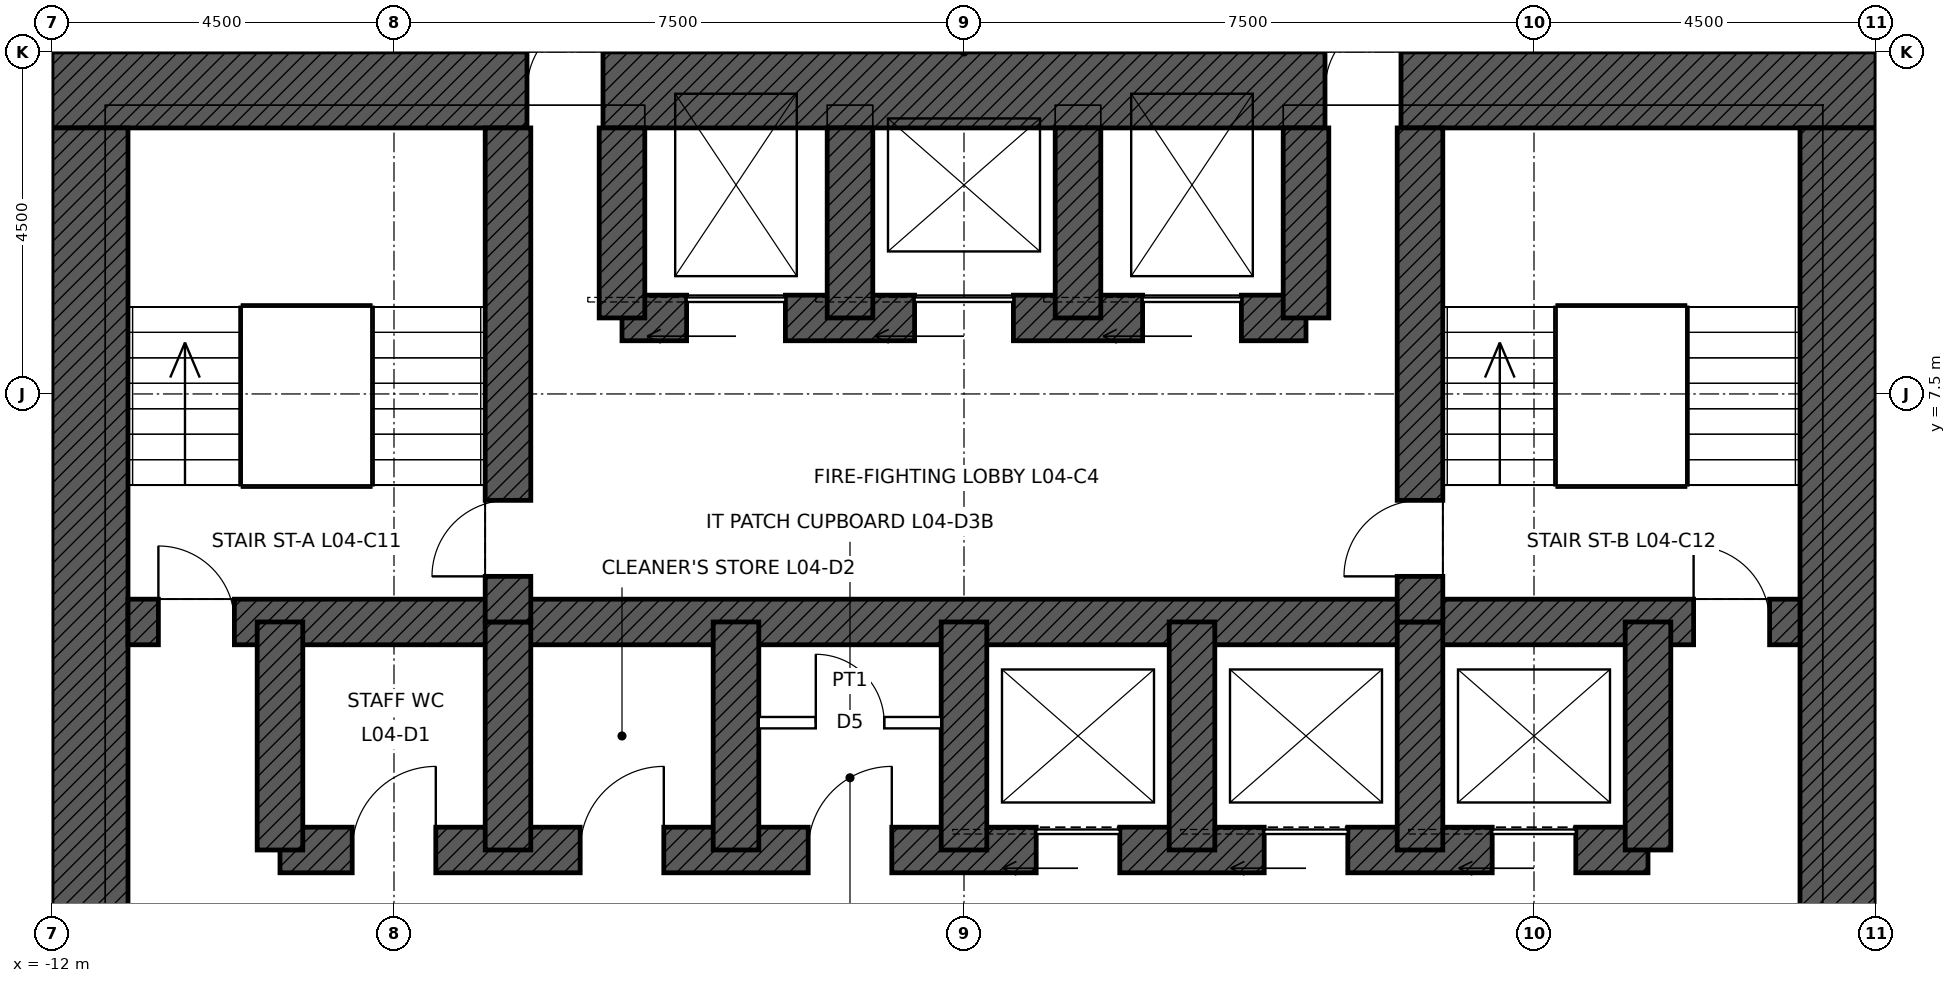
"""IFC4 building model, lengths in metres.
Left out: names, types, materials, properties, quantities, classifications, styles, units other than length and angle.
Written with IfcOpenShell. Run it as: python <this file> out.ifc"""

import sys

from ifc_helpers import new_model, si_unit, direction, frame, frame_2d, origin, place, context, subcontext, project, spatial, rectangle, extrude, element, fill, save


model = new_model("IFC4")
c1 = context("Model", 3, precision=1e-05, world=origin(), true_north=direction((0.0, 1.0)))
c2 = subcontext(c1, "Body", "Model", "MODEL_VIEW")
j1 = project(units=[si_unit("LENGTHUNIT", "METRE"), si_unit("PLANEANGLEUNIT", "RADIAN")], contexts=[c1])
p1 = place(None, origin())
s1 = spatial("IfcSite", under=j1, at=p1, CompositionType="ELEMENT")
p2 = place(p1, origin())
s2 = spatial("IfcBuilding", under=s1, at=p2, CompositionType="ELEMENT")
p3 = place(p2, frame((0.0, 0.0, 23.4)))
s3 = spatial("IfcBuildingStorey", under=s2, at=p3, CompositionType="ELEMENT", Elevation=23.4)
p4 = place(p3, frame((-12.0, 11.5, 0.0), z_axis=(0.0, 0.0, 1.0), x_axis=(1.0, 0.0, 0.0)))
e1 = element("IfcWall", 1, at=p4, inside=s3, PredefinedType="SHEAR", context=c2, shape_type="SweptSolid", body=[
    extrude(rectangle(XDim=24.0, YDim=1.0, at=frame_2d((12.0, 0.0))), origin(), (0.0, 0.0, 1.0), 5.0),
])
p5 = place(p4, frame((6.25, 0.0, 0.0)))
e2 = element("IfcOpeningElement", 2, at=p5, cuts=e1, PredefinedType="OPENING", context=c2, shape_type="SweptSolid", body=[
    extrude(rectangle(XDim=1.0, YDim=2.4, at=frame_2d((0.5, 1.2))), frame((0.0, 0.51, 0.0), z_axis=(0.0, -1.0, 0.0), x_axis=(1.0, 0.0, 0.0)), (0.0, 0.0, 1.0), 1.02),
])
p6 = place(p4, frame((16.75, 0.0, 0.0)))
e3 = element("IfcOpeningElement", 3, at=p6, cuts=e1, PredefinedType="OPENING", context=c2, shape_type="SweptSolid", body=[
    extrude(rectangle(XDim=1.0, YDim=2.4, at=frame_2d((0.5, 1.2))), frame((0.0, 0.51, 0.0), z_axis=(0.0, -1.0, 0.0), x_axis=(1.0, 0.0, 0.0)), (0.0, 0.0, 1.0), 1.02),
])
p7 = place(p3, frame((11.5, 11.0, 0.0), z_axis=(0.0, 0.0, 1.0), x_axis=(0.0, -1.0, 0.0)))
e4 = element("IfcWall", 4, at=p7, inside=s3, PredefinedType="SHEAR", context=c2, shape_type="SweptSolid", body=[
    extrude(rectangle(XDim=22.0, YDim=1.0, at=frame_2d((11.0, 0.0))), origin(), (0.0, 0.0, 1.0), 5.0),
])
p8 = place(p7, frame((10.5, 0.0, 0.0)))
e5 = element("IfcOpeningElement", 5, at=p8, cuts=e4, PredefinedType="OPENING", context=c2, shape_type="SweptSolid", body=[
    extrude(rectangle(XDim=1.0, YDim=2.4, at=frame_2d((0.5, 1.2))), frame((0.0, 0.51, 0.0), z_axis=(0.0, -1.0, 0.0), x_axis=(1.0, 0.0, 0.0)), (0.0, 0.0, 1.0), 1.02),
])
p9 = place(p3, frame((-11.5, -11.0, 0.0), z_axis=(0.0, 0.0, 1.0), x_axis=(0.0, 1.0, 0.0)))
e6 = element("IfcWall", 6, at=p9, inside=s3, PredefinedType="SHEAR", context=c2, shape_type="SweptSolid", body=[
    extrude(rectangle(XDim=22.0, YDim=1.0, at=frame_2d((11.0, 0.0))), origin(), (0.0, 0.0, 1.0), 5.0),
])
p10 = place(p9, frame((10.5, 0.0, 0.0)))
e7 = element("IfcOpeningElement", 7, at=p10, cuts=e6, PredefinedType="OPENING", context=c2, shape_type="SweptSolid", body=[
    extrude(rectangle(XDim=1.0, YDim=2.4, at=frame_2d((0.5, 1.2))), frame((0.0, 0.51, 0.0), z_axis=(0.0, -1.0, 0.0), x_axis=(1.0, 0.0, 0.0)), (0.0, 0.0, 1.0), 1.02),
])
p11 = place(p3, frame((-11.0, 4.5, 0.0), z_axis=(0.0, 0.0, 1.0), x_axis=(1.0, 0.0, 0.0)))
e8 = element("IfcWall", 8, at=p11, inside=s3, PredefinedType="SHEAR", context=c2, shape_type="SweptSolid", body=[
    extrude(rectangle(XDim=22.0, YDim=0.6, at=frame_2d((11.0, 0.0))), origin(), (0.0, 0.0, 1.0), 5.0),
])
p12 = place(p11, frame((0.4, 0.0, 0.0)))
e9 = element("IfcOpeningElement", 9, at=p12, cuts=e8, PredefinedType="OPENING", context=c2, shape_type="SweptSolid", body=[
    extrude(rectangle(XDim=1.0, YDim=2.1, at=frame_2d((0.5, 1.05))), frame((0.0, 0.31, 0.0), z_axis=(0.0, -1.0, 0.0), x_axis=(1.0, 0.0, 0.0)), (0.0, 0.0, 1.0), 0.62),
])
p13 = place(p11, frame((20.6, 0.0, 0.0)))
e10 = element("IfcOpeningElement", 10, at=p13, cuts=e8, PredefinedType="OPENING", context=c2, shape_type="SweptSolid", body=[
    extrude(rectangle(XDim=1.0, YDim=2.1, at=frame_2d((0.5, 1.05))), frame((0.0, 0.31, 0.0), z_axis=(0.0, -1.0, 0.0), x_axis=(1.0, 0.0, 0.0)), (0.0, 0.0, 1.0), 0.62),
])
p14 = place(p3, frame((-9.0, 1.5, 0.0), z_axis=(0.0, 0.0, 1.0), x_axis=(1.0, 0.0, 0.0)))
e11 = element("IfcWall", 11, at=p14, inside=s3, PredefinedType="SHEAR", context=c2, shape_type="SweptSolid", body=[
    extrude(rectangle(XDim=18.0, YDim=0.6, at=frame_2d((9.0, 0.0))), origin(), (0.0, 0.0, 1.0), 5.0),
])
p15 = place(p14, frame((9.95, 0.0, 0.0)))
e12 = element("IfcOpeningElement", 12, at=p15, cuts=e11, PredefinedType="OPENING", context=c2, shape_type="SweptSolid", body=[
    extrude(rectangle(XDim=1.1, YDim=2.1, at=frame_2d((0.55, 1.05))), frame((0.0, 0.31, 0.0), z_axis=(0.0, -1.0, 0.0), x_axis=(1.0, 0.0, 0.0)), (0.0, 0.0, 1.0), 0.62),
])
p16 = place(p14, frame((12.95, 0.0, 0.0)))
e13 = element("IfcOpeningElement", 13, at=p16, cuts=e11, PredefinedType="OPENING", context=c2, shape_type="SweptSolid", body=[
    extrude(rectangle(XDim=1.1, YDim=2.1, at=frame_2d((0.55, 1.05))), frame((0.0, 0.31, 0.0), z_axis=(0.0, -1.0, 0.0), x_axis=(1.0, 0.0, 0.0)), (0.0, 0.0, 1.0), 0.62),
])
p17 = place(p14, frame((15.95, 0.0, 0.0)))
e14 = element("IfcOpeningElement", 14, at=p17, cuts=e11, PredefinedType="OPENING", context=c2, shape_type="SweptSolid", body=[
    extrude(rectangle(XDim=1.1, YDim=2.1, at=frame_2d((0.55, 1.05))), frame((0.0, 0.31, 0.0), z_axis=(0.0, -1.0, 0.0), x_axis=(1.0, 0.0, 0.0)), (0.0, 0.0, 1.0), 0.62),
])
p18 = place(p14, frame((0.95, 0.0, 0.0)))
e15 = element("IfcOpeningElement", 15, at=p18, cuts=e11, PredefinedType="OPENING", context=c2, shape_type="SweptSolid", body=[
    extrude(rectangle(XDim=1.1, YDim=2.1, at=frame_2d((0.55, 1.05))), frame((0.0, 0.31, 0.0), z_axis=(0.0, -1.0, 0.0), x_axis=(1.0, 0.0, 0.0)), (0.0, 0.0, 1.0), 0.62),
])
p19 = place(p14, frame((3.95, 0.0, 0.0)))
e16 = element("IfcOpeningElement", 16, at=p19, cuts=e11, PredefinedType="OPENING", context=c2, shape_type="SweptSolid", body=[
    extrude(rectangle(XDim=1.1, YDim=2.1, at=frame_2d((0.55, 1.05))), frame((0.0, 0.31, 0.0), z_axis=(0.0, -1.0, 0.0), x_axis=(1.0, 0.0, 0.0)), (0.0, 0.0, 1.0), 0.62),
])
p20 = place(p14, frame((6.95, 0.0, 0.0)))
e17 = element("IfcOpeningElement", 17, at=p20, cuts=e11, PredefinedType="OPENING", context=c2, shape_type="SweptSolid", body=[
    extrude(rectangle(XDim=1.1, YDim=2.1, at=frame_2d((0.55, 1.05))), frame((0.0, 0.31, 0.0), z_axis=(0.0, -1.0, 0.0), x_axis=(1.0, 0.0, 0.0)), (0.0, 0.0, 1.0), 0.62),
])
p21 = place(p3, frame((-4.5, 8.5, 0.0), z_axis=(0.0, 0.0, 1.0), x_axis=(1.0, 0.0, 0.0)))
e18 = element("IfcWall", 18, at=p21, inside=s3, PredefinedType="SHEAR", context=c2, shape_type="SweptSolid", body=[
    extrude(rectangle(XDim=9.0, YDim=0.6, at=frame_2d((4.5, 0.0))), origin(), (0.0, 0.0, 1.0), 5.0),
])
p22 = place(p21, frame((0.85, 0.0, 0.0)))
e19 = element("IfcOpeningElement", 19, at=p22, cuts=e18, PredefinedType="OPENING", context=c2, shape_type="SweptSolid", body=[
    extrude(rectangle(XDim=1.3, YDim=2.4, at=frame_2d((0.65, 1.2))), frame((0.0, 0.31, 0.0), z_axis=(0.0, -1.0, 0.0), x_axis=(1.0, 0.0, 0.0)), (0.0, 0.0, 1.0), 0.62),
])
p23 = place(p21, frame((6.85, 0.0, 0.0)))
e20 = element("IfcOpeningElement", 20, at=p23, cuts=e18, PredefinedType="OPENING", context=c2, shape_type="SweptSolid", body=[
    extrude(rectangle(XDim=1.3, YDim=2.4, at=frame_2d((0.65, 1.2))), frame((0.0, 0.31, 0.0), z_axis=(0.0, -1.0, 0.0), x_axis=(1.0, 0.0, 0.0)), (0.0, 0.0, 1.0), 0.62),
])
p24 = place(p21, frame((3.85, 0.0, 0.0)))
e21 = element("IfcOpeningElement", 21, at=p24, cuts=e18, PredefinedType="OPENING", context=c2, shape_type="SweptSolid", body=[
    extrude(rectangle(XDim=1.3, YDim=2.4, at=frame_2d((0.65, 1.2))), frame((0.0, 0.31, 0.0), z_axis=(0.0, -1.0, 0.0), x_axis=(1.0, 0.0, 0.0)), (0.0, 0.0, 1.0), 0.62),
])
for number, where, z_axis, x_axis in (
    (22, (-9.0, 1.5, 0.0), (0.0, 0.0, 1.0), (0.0, 1.0, 0.0)),
    (23, (9.0, 1.5, 0.0), (0.0, 0.0, 1.0), (0.0, 1.0, 0.0)),
    (24, (-6.0, 1.5, 0.0), (0.0, 0.0, 1.0), (0.0, 1.0, 0.0)),
    (25, (-3.0, 1.5, 0.0), (0.0, 0.0, 1.0), (0.0, 1.0, 0.0)),
    (26, (0.0, 1.5, 0.0), (0.0, 0.0, 1.0), (0.0, 1.0, 0.0)),
    (27, (3.0, 1.5, 0.0), (0.0, 0.0, 1.0), (0.0, 1.0, 0.0)),
    (28, (6.0, 1.5, 0.0), (0.0, 0.0, 1.0), (0.0, 1.0, 0.0)),
):
    element("IfcWall", number, at=place(p3, frame(where, z_axis=z_axis, x_axis=x_axis)), inside=s3, PredefinedType="SHEAR", context=c2, shape_type="SweptSolid", body=[
        extrude(rectangle(XDim=3.0, YDim=0.6, at=frame_2d((1.5, 0.0))), origin(), (0.0, 0.0, 1.0), 5.0),
    ])
p25 = place(p3, frame((-6.0, 4.5, 0.0), z_axis=(0.0, 0.0, 1.0), x_axis=(0.0, 1.0, 0.0)))
e29 = element("IfcWall", 29, at=p25, inside=s3, PredefinedType="SHEAR", context=c2, shape_type="SweptSolid", body=[
    extrude(rectangle(XDim=6.5, YDim=0.6, at=frame_2d((3.25, 0.0))), origin(), (0.0, 0.0, 1.0), 5.0),
])
p26 = place(p25, frame((0.6, 0.0, 0.0)))
e30 = element("IfcOpeningElement", 30, at=p26, cuts=e29, PredefinedType="OPENING", context=c2, shape_type="SweptSolid", body=[
    extrude(rectangle(XDim=1.0, YDim=2.1, at=frame_2d((0.5, 1.05))), frame((0.0, 0.31, 0.0), z_axis=(0.0, -1.0, 0.0), x_axis=(1.0, 0.0, 0.0)), (0.0, 0.0, 1.0), 0.62),
])
p27 = place(p3, frame((6.0, 4.5, 0.0), z_axis=(0.0, 0.0, 1.0), x_axis=(0.0, 1.0, 0.0)))
e31 = element("IfcWall", 31, at=p27, inside=s3, PredefinedType="SHEAR", context=c2, shape_type="SweptSolid", body=[
    extrude(rectangle(XDim=6.5, YDim=0.6, at=frame_2d((3.25, 0.0))), origin(), (0.0, 0.0, 1.0), 5.0),
])
p28 = place(p27, frame((0.6, 0.0, 0.0)))
e32 = element("IfcOpeningElement", 32, at=p28, cuts=e31, PredefinedType="OPENING", context=c2, shape_type="SweptSolid", body=[
    extrude(rectangle(XDim=1.0, YDim=2.1, at=frame_2d((0.5, 1.05))), frame((0.0, 0.31, 0.0), z_axis=(0.0, -1.0, 0.0), x_axis=(1.0, 0.0, 0.0)), (0.0, 0.0, 1.0), 0.62),
])
for number, where, z_axis, x_axis in (
    (33, (-4.5, 8.5, 0.0), (0.0, 0.0, 1.0), (0.0, 1.0, 0.0)),
    (34, (4.5, 8.5, 0.0), (0.0, 0.0, 1.0), (0.0, 1.0, 0.0)),
    (35, (-1.5, 8.5, 0.0), (0.0, 0.0, 1.0), (0.0, 1.0, 0.0)),
    (36, (1.5, 8.5, 0.0), (0.0, 0.0, 1.0), (0.0, 1.0, 0.0)),
):
    element("IfcWall", number, at=place(p3, frame(where, z_axis=z_axis, x_axis=x_axis)), inside=s3, PredefinedType="SHEAR", context=c2, shape_type="SweptSolid", body=[
        extrude(rectangle(XDim=2.5, YDim=0.6, at=frame_2d((1.25, 0.0))), origin(), (0.0, 0.0, 1.0), 5.0),
    ])
p29 = place(p3, frame((-2.7, 3.175, 0.0), z_axis=(0.0, 0.0, 1.0), x_axis=(1.0, 0.0, 0.0)))
e37 = element("IfcWall", 37, at=p29, inside=s3, PredefinedType="PARTITIONING", context=c2, shape_type="SweptSolid", body=[
    extrude(rectangle(XDim=2.4, YDim=0.15, at=frame_2d((1.2, 0.0))), origin(), (0.0, 0.0, 1.0), 4.75),
])
p30 = place(p29, frame((0.75, 0.0, 0.0)))
e38 = element("IfcOpeningElement", 38, at=p30, cuts=e37, PredefinedType="OPENING", context=c2, shape_type="SweptSolid", body=[
    extrude(rectangle(XDim=0.9, YDim=2.1, at=frame_2d((0.45, 1.05))), frame((0.0, 0.085, 0.0), z_axis=(0.0, -1.0, 0.0), x_axis=(1.0, 0.0, 0.0)), (0.0, 0.0, 1.0), 0.17),
])
p31 = place(p12, origin())
e39 = element("IfcDoor", 39, at=p31, inside=s3, OperationType="SINGLE_SWING_LEFT", PredefinedType="DOOR", context=c2, shape_type="SweptSolid", body=[
    extrude(rectangle(XDim=1.0, YDim=2.1, at=frame_2d((0.5, 1.05))), frame((0.0, 0.025, 0.0), z_axis=(0.0, -1.0, 0.0), x_axis=(1.0, 0.0, 0.0)), (0.0, 0.0, 1.0), 0.05),
])
fill(e9, e39)
p32 = place(p13, origin())
e40 = element("IfcDoor", 40, at=p32, inside=s3, OperationType="SINGLE_SWING_LEFT", PredefinedType="DOOR", context=c2, shape_type="SweptSolid", body=[
    extrude(rectangle(XDim=1.0, YDim=2.1, at=frame_2d((0.5, 1.05))), frame((0.0, 0.025, 0.0), z_axis=(0.0, -1.0, 0.0), x_axis=(1.0, 0.0, 0.0)), (0.0, 0.0, 1.0), 0.05),
])
fill(e10, e40)
p33 = place(p26, origin())
e41 = element("IfcDoor", 41, at=p33, inside=s3, OperationType="SINGLE_SWING_LEFT", PredefinedType="DOOR", context=c2, shape_type="SweptSolid", body=[
    extrude(rectangle(XDim=1.0, YDim=2.1, at=frame_2d((0.5, 1.05))), frame((0.0, 0.025, 0.0), z_axis=(0.0, -1.0, 0.0), x_axis=(1.0, 0.0, 0.0)), (0.0, 0.0, 1.0), 0.05),
])
fill(e30, e41)
p34 = place(p28, origin())
e42 = element("IfcDoor", 42, at=p34, inside=s3, OperationType="SINGLE_SWING_LEFT", PredefinedType="DOOR", context=c2, shape_type="SweptSolid", body=[
    extrude(rectangle(XDim=1.0, YDim=2.1, at=frame_2d((0.5, 1.05))), frame((0.0, 0.025, 0.0), z_axis=(0.0, -1.0, 0.0), x_axis=(1.0, 0.0, 0.0)), (0.0, 0.0, 1.0), 0.05),
])
fill(e32, e42)
p35 = place(p5, origin())
e43 = element("IfcDoor", 43, at=p35, inside=s3, OperationType="SINGLE_SWING_RIGHT", PredefinedType="DOOR", context=c2, shape_type="SweptSolid", body=[
    extrude(rectangle(XDim=1.0, YDim=2.4, at=frame_2d((0.5, 1.2))), frame((0.0, 0.485, 0.0), z_axis=(0.0, -1.0, 0.0), x_axis=(1.0, 0.0, 0.0)), (0.0, 0.0, 1.0), 0.05),
])
fill(e2, e43)
p36 = place(p6, origin())
e44 = element("IfcDoor", 44, at=p36, inside=s3, OperationType="SINGLE_SWING_RIGHT", PredefinedType="DOOR", context=c2, shape_type="SweptSolid", body=[
    extrude(rectangle(XDim=1.0, YDim=2.4, at=frame_2d((0.5, 1.2))), frame((0.0, 0.485, 0.0), z_axis=(0.0, -1.0, 0.0), x_axis=(1.0, 0.0, 0.0)), (0.0, 0.0, 1.0), 0.05),
])
fill(e3, e44)
p37 = place(p22, origin())
e45 = element("IfcDoor", 45, at=p37, inside=s3, OperationType="SLIDING_TO_LEFT", PredefinedType="DOOR", context=c2, shape_type="SweptSolid", body=[
    extrude(rectangle(XDim=1.3, YDim=2.4, at=frame_2d((0.65, 1.2))), frame((0.0, 0.025, 0.0), z_axis=(0.0, -1.0, 0.0), x_axis=(1.0, 0.0, 0.0)), (0.0, 0.0, 1.0), 0.05),
])
fill(e19, e45)
p38 = place(p23, origin())
e46 = element("IfcDoor", 46, at=p38, inside=s3, OperationType="SLIDING_TO_LEFT", PredefinedType="DOOR", context=c2, shape_type="SweptSolid", body=[
    extrude(rectangle(XDim=1.3, YDim=2.4, at=frame_2d((0.65, 1.2))), frame((0.0, 0.025, 0.0), z_axis=(0.0, -1.0, 0.0), x_axis=(1.0, 0.0, 0.0)), (0.0, 0.0, 1.0), 0.05),
])
fill(e20, e46)
p39 = place(p24, origin())
e47 = element("IfcDoor", 47, at=p39, inside=s3, OperationType="SLIDING_TO_LEFT", PredefinedType="DOOR", context=c2, shape_type="SweptSolid", body=[
    extrude(rectangle(XDim=1.3, YDim=2.4, at=frame_2d((0.65, 1.2))), frame((0.0, 0.025, 0.0), z_axis=(0.0, -1.0, 0.0), x_axis=(1.0, 0.0, 0.0)), (0.0, 0.0, 1.0), 0.05),
])
fill(e21, e47)
p40 = place(p15, origin())
e48 = element("IfcDoor", 48, at=p40, inside=s3, OperationType="SLIDING_TO_LEFT", PredefinedType="DOOR", context=c2, shape_type="SweptSolid", body=[
    extrude(rectangle(XDim=1.1, YDim=2.1, at=frame_2d((0.55, 1.05))), frame((0.0, 0.025, 0.0), z_axis=(0.0, -1.0, 0.0), x_axis=(1.0, 0.0, 0.0)), (0.0, 0.0, 1.0), 0.05),
])
fill(e12, e48)
p41 = place(p16, origin())
e49 = element("IfcDoor", 49, at=p41, inside=s3, OperationType="SLIDING_TO_LEFT", PredefinedType="DOOR", context=c2, shape_type="SweptSolid", body=[
    extrude(rectangle(XDim=1.1, YDim=2.1, at=frame_2d((0.55, 1.05))), frame((0.0, 0.025, 0.0), z_axis=(0.0, -1.0, 0.0), x_axis=(1.0, 0.0, 0.0)), (0.0, 0.0, 1.0), 0.05),
])
fill(e13, e49)
p42 = place(p17, origin())
e50 = element("IfcDoor", 50, at=p42, inside=s3, OperationType="SLIDING_TO_LEFT", PredefinedType="DOOR", context=c2, shape_type="SweptSolid", body=[
    extrude(rectangle(XDim=1.1, YDim=2.1, at=frame_2d((0.55, 1.05))), frame((0.0, 0.025, 0.0), z_axis=(0.0, -1.0, 0.0), x_axis=(1.0, 0.0, 0.0)), (0.0, 0.0, 1.0), 0.05),
])
fill(e14, e50)
p43 = place(p18, origin())
e51 = element("IfcDoor", 51, at=p43, inside=s3, OperationType="SINGLE_SWING_RIGHT", PredefinedType="DOOR", context=c2, shape_type="SweptSolid", body=[
    extrude(rectangle(XDim=1.1, YDim=2.1, at=frame_2d((0.55, 1.05))), frame((0.0, 0.025, 0.0), z_axis=(0.0, -1.0, 0.0), x_axis=(1.0, 0.0, 0.0)), (0.0, 0.0, 1.0), 0.05),
])
fill(e15, e51)
p44 = place(p19, origin())
e52 = element("IfcDoor", 52, at=p44, inside=s3, OperationType="SINGLE_SWING_RIGHT", PredefinedType="DOOR", context=c2, shape_type="SweptSolid", body=[
    extrude(rectangle(XDim=1.1, YDim=2.1, at=frame_2d((0.55, 1.05))), frame((0.0, 0.025, 0.0), z_axis=(0.0, -1.0, 0.0), x_axis=(1.0, 0.0, 0.0)), (0.0, 0.0, 1.0), 0.05),
])
fill(e16, e52)
p45 = place(p20, origin())
e53 = element("IfcDoor", 53, at=p45, inside=s3, OperationType="SINGLE_SWING_RIGHT", PredefinedType="DOOR", context=c2, shape_type="SweptSolid", body=[
    extrude(rectangle(XDim=1.1, YDim=2.1, at=frame_2d((0.55, 1.05))), frame((0.0, 0.025, 0.0), z_axis=(0.0, -1.0, 0.0), x_axis=(1.0, 0.0, 0.0)), (0.0, 0.0, 1.0), 0.05),
])
fill(e17, e53)
p46 = place(p30, origin())
e54 = element("IfcDoor", 54, at=p46, inside=s3, OperationType="SINGLE_SWING_LEFT", PredefinedType="DOOR", context=c2, shape_type="SweptSolid", body=[
    extrude(rectangle(XDim=0.9, YDim=2.1, at=frame_2d((0.45, 1.05))), frame((0.0, 0.025, 0.0), z_axis=(0.0, -1.0, 0.0), x_axis=(1.0, 0.0, 0.0)), (0.0, 0.0, 1.0), 0.05),
])
fill(e38, e54)
save(model, sys.argv[1])
